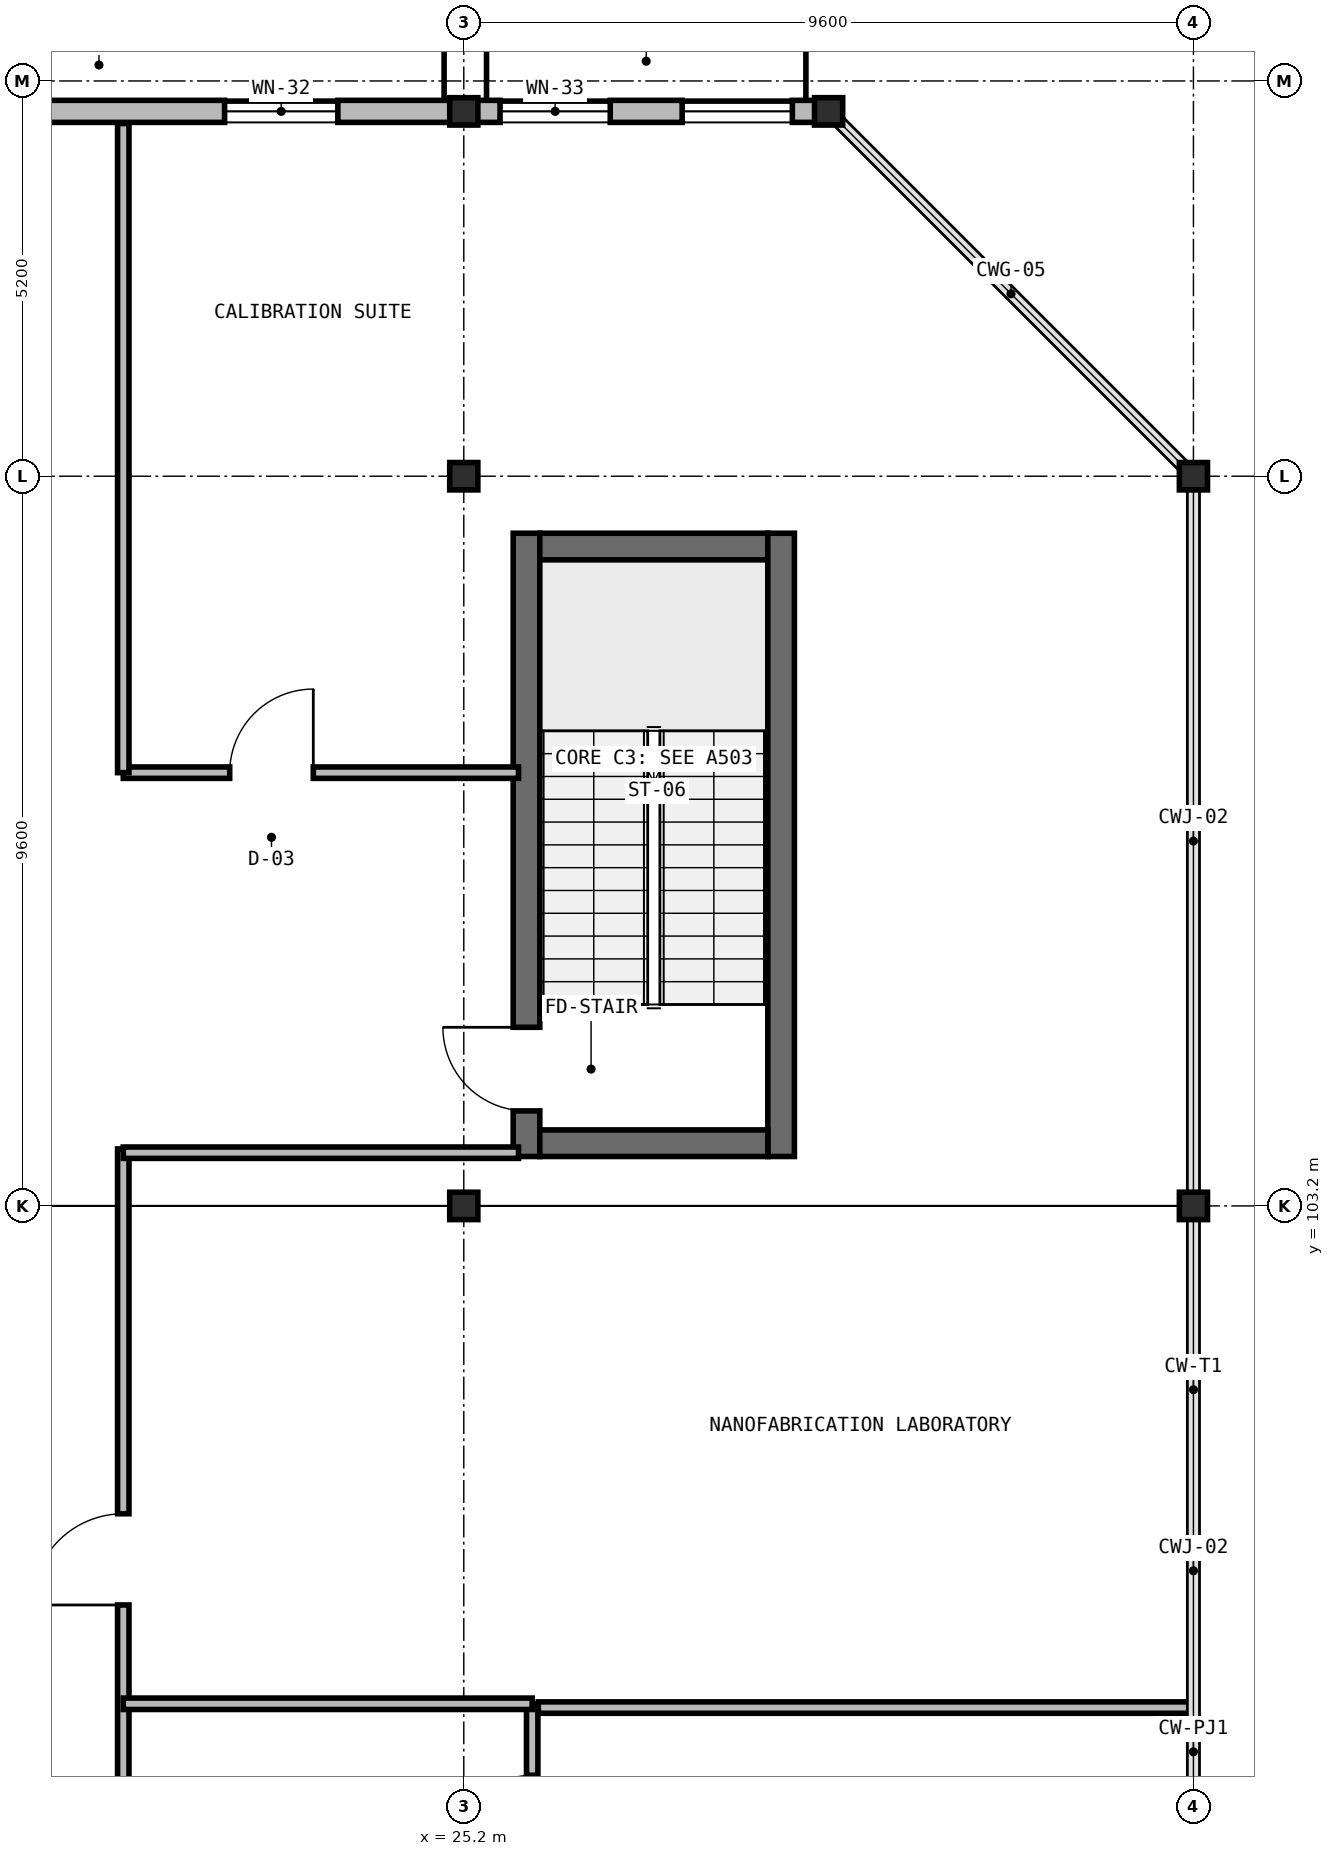
"""IFC4 building model, lengths in metres.
Left out: names, types, materials, properties, quantities, classifications, styles, units other than length and angle.
Written with IfcOpenShell. Run it as: python <this file> out.ifc"""

import sys

from ifc_helpers import new_model, si_unit, direction, frame, frame_2d, origin, origin_2d, place, context, subcontext, project, spatial, rectangle, i_section, extrude, element, fill, save


model = new_model("IFC4")
c1 = context("Model", 3, precision=1e-05, world=origin(), true_north=direction((0.0, 1.0)))
c2 = subcontext(c1, "Body", "Model", "MODEL_VIEW")
j1 = project(units=[si_unit("LENGTHUNIT", "METRE"), si_unit("PLANEANGLEUNIT", "RADIAN")], contexts=[c1])
p1 = place(None, origin())
s1 = spatial("IfcSite", under=j1, at=p1, CompositionType="ELEMENT")
p2 = place(p1, origin())
s2 = spatial("IfcBuilding", under=s1, at=p2, CompositionType="ELEMENT")
p3 = place(p2, frame((0.0, 0.0, 14.35)))
s3 = spatial("IfcBuildingStorey", under=s2, at=p3, CompositionType="ELEMENT", Elevation=14.35)
p4 = place(p3, frame((26.025, 103.85, 0.0), z_axis=(0.0, 0.0, 1.0), x_axis=(0.0, 1.0, 0.0)))
e1 = element("IfcWall", 1, at=p4, inside=s3, PredefinedType="SHEAR", context=c2, shape_type="SweptSolid", body=[
    extrude(rectangle(XDim=8.2, YDim=0.35, at=frame_2d((4.1, 0.0))), origin(), (0.0, 0.0, 1.0), 4.55),
])
p5 = place(p4, frame((0.6, 0.0, 0.0)))
e2 = element("IfcOpeningElement", 2, at=p5, cuts=e1, PredefinedType="OPENING", context=c2, shape_type="SweptSolid", body=[
    extrude(rectangle(XDim=1.1, YDim=2.15, at=frame_2d((0.55, 1.075))), frame((0.0, 0.185, 0.0), z_axis=(0.0, -1.0, 0.0), x_axis=(1.0, 0.0, 0.0)), (0.0, 0.0, 1.0), 0.37),
])
p6 = place(p3, frame((26.2, 111.875, 0.0), z_axis=(0.0, 0.0, 1.0), x_axis=(1.0, 0.0, 0.0)))
e3 = element("IfcWall", 3, at=p6, inside=s3, PredefinedType="SHEAR", context=c2, shape_type="SweptSolid", body=[
    extrude(rectangle(XDim=3.0, YDim=0.35, at=frame_2d((1.5, 0.0))), origin(), (0.0, 0.0, 1.0), 4.55),
])
p7 = place(p3, frame((29.375, 112.05, 0.0), z_axis=(0.0, 0.0, 1.0), x_axis=(0.0, -1.0, 0.0)))
e4 = element("IfcWall", 4, at=p7, inside=s3, PredefinedType="SHEAR", context=c2, shape_type="SweptSolid", body=[
    extrude(rectangle(XDim=8.2, YDim=0.35, at=frame_2d((4.1, 0.0))), origin(), (0.0, 0.0, 1.0), 4.55),
])
p8 = place(p3, frame((29.2, 104.025, 0.0), z_axis=(0.0, 0.0, 1.0), x_axis=(-1.0, 0.0, 0.0)))
e5 = element("IfcWall", 5, at=p8, inside=s3, PredefinedType="SHEAR", context=c2, shape_type="SweptSolid", body=[
    extrude(rectangle(XDim=3.0, YDim=0.35, at=frame_2d((1.5, 0.0))), origin(), (0.0, 0.0, 1.0), 4.55),
])
for number, where, z_axis, x_axis in (
    (6, (25.2, 103.2, 0.0), (0.0, 0.0, 1.0), (1.0, 0.0, 0.0)),
    (7, (25.2, 112.8, 0.0), (0.0, 0.0, 1.0), (1.0, 0.0, 0.0)),
    (8, (25.2, 117.6, 0.0), (0.0, 0.0, 1.0), (1.0, 0.0, 0.0)),
    (9, (34.8, 103.2, 0.0), (0.0, 0.0, 1.0), (1.0, 0.0, 0.0)),
    (10, (34.8, 112.8, 0.0), (0.0, 0.0, 1.0), (1.0, 0.0, 0.0)),
    (11, (30.0, 117.6, 0.0), (0.0, 0.0, 1.0), (1.0, 0.0, 0.0)),
):
    element("IfcColumn", number, at=place(p3, frame(where, z_axis=z_axis, x_axis=x_axis)), inside=s3, PredefinedType="COLUMN", context=c2, shape_type="SweptSolid", body=[
        extrude(i_section(OverallWidth=0.37, OverallDepth=0.36, WebThickness=0.014, FlangeThickness=0.022, at=origin_2d()), origin(), (0.0, 0.0, 1.0), 4.55),
    ])
p9 = place(p3, frame((15.604, 117.6, 0.0), z_axis=(0.0, 0.0, 1.0), x_axis=(1.0, 0.0, 0.0)))
e12 = element("IfcWall", 12, at=p9, inside=s3, PredefinedType="SOLIDWALL", context=c2, shape_type="SweptSolid", body=[
    extrude(rectangle(XDim=9.592, YDim=0.29, at=frame_2d((4.796, 0.0))), origin(), (0.0, 0.0, 1.0), 3.884),
])
p10 = place(p9, frame((6.449, 0.0, 0.95)))
e13 = element("IfcOpeningElement", 13, at=p10, cuts=e12, PredefinedType="OPENING", context=c2, shape_type="SweptSolid", body=[
    extrude(rectangle(XDim=1.49, YDim=1.43, at=frame_2d((0.745, 0.715))), frame((0.0, 0.155, 0.0), z_axis=(0.0, -1.0, 0.0), x_axis=(1.0, 0.0, 0.0)), (0.0, 0.0, 1.0), 0.31),
])
p11 = place(p3, frame((25.204, 117.6, 0.0), z_axis=(0.0, 0.0, 1.0), x_axis=(1.0, 0.0, 0.0)))
e14 = element("IfcWall", 14, at=p11, inside=s3, PredefinedType="SOLIDWALL", context=c2, shape_type="SweptSolid", body=[
    extrude(rectangle(XDim=4.792, YDim=0.29, at=frame_2d((2.396, 0.0))), origin(), (0.0, 0.0, 1.0), 4.37),
])
p12 = place(p11, frame((0.473, 0.0, 0.95)))
e15 = element("IfcOpeningElement", 15, at=p12, cuts=e14, PredefinedType="OPENING", context=c2, shape_type="SweptSolid", body=[
    extrude(rectangle(XDim=1.45, YDim=1.35, at=frame_2d((0.725, 0.675))), frame((0.0, 0.155, 0.0), z_axis=(0.0, -1.0, 0.0), x_axis=(1.0, 0.0, 0.0)), (0.0, 0.0, 1.0), 0.31),
])
p13 = place(p11, frame((2.869, 0.0, 0.95)))
e16 = element("IfcOpeningElement", 16, at=p13, cuts=e14, PredefinedType="OPENING", context=c2, shape_type="SweptSolid", body=[
    extrude(rectangle(XDim=1.45, YDim=1.35, at=frame_2d((0.725, 0.675))), frame((0.0, 0.155, 0.0), z_axis=(0.0, -1.0, 0.0), x_axis=(1.0, 0.0, 0.0)), (0.0, 0.0, 1.0), 0.31),
])
p14 = place(p3, frame((26.18, 96.6, 0.0), z_axis=(0.0, 0.0, 1.0), x_axis=(1.0, 0.0, 0.0)))
e17 = element("IfcWall", 17, at=p14, inside=s3, PredefinedType="PARTITIONING", context=c2, shape_type="SweptSolid", body=[
    extrude(rectangle(XDim=8.56, YDim=0.15, at=frame_2d((4.28, 0.0))), origin(), (0.0, 0.0, 1.0), 4.3),
])
p15 = place(p3, frame((26.1, 89.12, 0.0), z_axis=(0.0, 0.0, 1.0), x_axis=(0.0, 1.0, 0.0)))
e18 = element("IfcWall", 18, at=p15, inside=s3, PredefinedType="PARTITIONING", context=c2, shape_type="SweptSolid", body=[
    extrude(rectangle(XDim=7.53, YDim=0.15, at=frame_2d((3.765, 0.0))), origin(), (0.0, 0.0, 1.0), 4.3),
])
p16 = place(p15, frame((0.66, 0.0, 0.0)))
e19 = element("IfcOpeningElement", 19, at=p16, cuts=e18, PredefinedType="OPENING", context=c2, shape_type="SweptSolid", body=[
    extrude(rectangle(XDim=0.95, YDim=2.1, at=frame_2d((0.475, 1.05))), frame((0.0, 0.085, 0.0), z_axis=(0.0, -1.0, 0.0), x_axis=(1.0, 0.0, 0.0)), (0.0, 0.0, 1.0), 0.17),
])
p17 = place(p15, frame((2.44, 0.0, 0.0)))
e20 = element("IfcOpeningElement", 20, at=p17, cuts=e18, PredefinedType="OPENING", context=c2, shape_type="SweptSolid", body=[
    extrude(rectangle(XDim=0.95, YDim=2.1, at=frame_2d((0.475, 1.05))), frame((0.0, 0.085, 0.0), z_axis=(0.0, -1.0, 0.0), x_axis=(1.0, 0.0, 0.0)), (0.0, 0.0, 1.0), 0.17),
])
p18 = place(p15, frame((5.64, 0.0, 0.0)))
e21 = element("IfcOpeningElement", 21, at=p18, cuts=e18, PredefinedType="OPENING", context=c2, shape_type="SweptSolid", body=[
    extrude(rectangle(XDim=0.95, YDim=2.1, at=frame_2d((0.475, 1.05))), frame((0.0, 0.085, 0.0), z_axis=(0.0, -1.0, 0.0), x_axis=(1.0, 0.0, 0.0)), (0.0, 0.0, 1.0), 0.17),
])
p19 = place(p3, frame((20.72, 108.9, 0.0), z_axis=(0.0, 0.0, 1.0), x_axis=(1.0, 0.0, 0.0)))
e22 = element("IfcWall", 22, at=p19, inside=s3, PredefinedType="PARTITIONING", context=c2, shape_type="SweptSolid", body=[
    extrude(rectangle(XDim=5.2, YDim=0.15, at=frame_2d((2.6, 0.0))), origin(), (0.0, 0.0, 1.0), 4.3),
])
p20 = place(p19, frame((1.4, 0.0, 0.0)))
e23 = element("IfcOpeningElement", 23, at=p20, cuts=e22, PredefinedType="OPENING", context=c2, shape_type="SweptSolid", body=[
    extrude(rectangle(XDim=1.1, YDim=2.2, at=frame_2d((0.55, 1.1))), frame((0.0, 0.085, 0.0), z_axis=(0.0, -1.0, 0.0), x_axis=(1.0, 0.0, 0.0)), (0.0, 0.0, 1.0), 0.17),
])
p21 = place(p3, frame((20.72, 108.9, 0.0), z_axis=(0.0, 0.0, 1.0), x_axis=(0.0, 1.0, 0.0)))
e24 = element("IfcWall", 24, at=p21, inside=s3, PredefinedType="PARTITIONING", context=c2, shape_type="SweptSolid", body=[
    extrude(rectangle(XDim=8.54, YDim=0.15, at=frame_2d((4.27, 0.0))), origin(), (0.0, 0.0, 1.0), 4.3),
])
p22 = place(p3, frame((20.72, 91.15, 0.0), z_axis=(0.0, 0.0, 1.0), x_axis=(0.0, 1.0, 0.0)))
e25 = element("IfcWall", 25, at=p22, inside=s3, PredefinedType="PARTITIONING", context=c2, shape_type="SweptSolid", body=[
    extrude(rectangle(XDim=12.8, YDim=0.15, at=frame_2d((6.4, 0.0))), origin(), (0.0, 0.0, 1.0), 4.3),
])
p23 = place(p22, frame((1.8, 0.0, 0.0)))
e26 = element("IfcOpeningElement", 26, at=p23, cuts=e25, PredefinedType="OPENING", context=c2, shape_type="SweptSolid", body=[
    extrude(rectangle(XDim=1.1, YDim=2.2, at=frame_2d((0.55, 1.1))), frame((0.0, 0.085, 0.0), z_axis=(0.0, -1.0, 0.0), x_axis=(1.0, 0.0, 0.0)), (0.0, 0.0, 1.0), 0.17),
])
p24 = place(p22, frame((6.8, 0.0, 0.0)))
e27 = element("IfcOpeningElement", 27, at=p24, cuts=e25, PredefinedType="OPENING", context=c2, shape_type="SweptSolid", body=[
    extrude(rectangle(XDim=1.2, YDim=2.2, at=frame_2d((0.6, 1.1))), frame((0.0, 0.085, 0.0), z_axis=(0.0, -1.0, 0.0), x_axis=(1.0, 0.0, 0.0)), (0.0, 0.0, 1.0), 0.17),
])
p25 = place(p3, frame((20.72, 103.9, 0.0), z_axis=(0.0, 0.0, 1.0), x_axis=(1.0, 0.0, 0.0)))
e28 = element("IfcWall", 28, at=p25, inside=s3, PredefinedType="PARTITIONING", context=c2, shape_type="SweptSolid", body=[
    extrude(rectangle(XDim=5.2, YDim=0.15, at=frame_2d((2.6, 0.0))), origin(), (0.0, 0.0, 1.0), 4.3),
])
p26 = place(p3, frame((20.72, 96.65, 0.0), z_axis=(0.0, 0.0, 1.0), x_axis=(1.0, 0.0, 0.0)))
e29 = element("IfcWall", 29, at=p26, inside=s3, PredefinedType="PARTITIONING", context=c2, shape_type="SweptSolid", body=[
    extrude(rectangle(XDim=5.38, YDim=0.15, at=frame_2d((2.69, 0.0))), origin(), (0.0, 0.0, 1.0), 4.3),
])
p27 = place(p10, origin())
e30 = element("IfcWindow", 30, at=p27, inside=s3, PartitioningType="SINGLE_PANEL", PredefinedType="WINDOW", context=c2, shape_type="SweptSolid", body=[
    extrude(rectangle(XDim=1.49, YDim=1.43, at=frame_2d((0.745, 0.715))), frame((0.0, 0.03, 0.0), z_axis=(0.0, -1.0, 0.0), x_axis=(1.0, 0.0, 0.0)), (0.0, 0.0, 1.0), 0.06),
])
fill(e13, e30)
p28 = place(p12, origin())
e31 = element("IfcWindow", 31, at=p28, inside=s3, PartitioningType="SINGLE_PANEL", PredefinedType="WINDOW", context=c2, shape_type="SweptSolid", body=[
    extrude(rectangle(XDim=1.45, YDim=1.35, at=frame_2d((0.725, 0.675))), frame((0.0, 0.03, 0.0), z_axis=(0.0, -1.0, 0.0), x_axis=(1.0, 0.0, 0.0)), (0.0, 0.0, 1.0), 0.06),
])
fill(e15, e31)
p29 = place(p13, origin())
e32 = element("IfcWindow", 32, at=p29, inside=s3, PartitioningType="SINGLE_PANEL", PredefinedType="WINDOW", context=c2, shape_type="SweptSolid", body=[
    extrude(rectangle(XDim=1.45, YDim=1.35, at=frame_2d((0.725, 0.675))), frame((0.0, 0.03, 0.0), z_axis=(0.0, -1.0, 0.0), x_axis=(1.0, 0.0, 0.0)), (0.0, 0.0, 1.0), 0.06),
])
fill(e16, e32)
p30 = place(p5, origin())
e33 = element("IfcDoor", 33, at=p30, inside=s3, OperationType="SINGLE_SWING_RIGHT", PredefinedType="DOOR", context=c2, shape_type="SweptSolid", body=[
    extrude(rectangle(XDim=1.1, YDim=2.15, at=frame_2d((0.55, 1.075))), frame((0.0, 0.025, 0.0), z_axis=(0.0, -1.0, 0.0), x_axis=(1.0, 0.0, 0.0)), (0.0, 0.0, 1.0), 0.05),
])
fill(e2, e33)
p31 = place(p18, origin())
e34 = element("IfcDoor", 34, at=p31, inside=s3, OperationType="SINGLE_SWING_LEFT", PredefinedType="DOOR", context=c2, shape_type="SweptSolid", body=[
    extrude(rectangle(XDim=0.95, YDim=2.1, at=frame_2d((0.475, 1.05))), frame((0.0, 0.025, 0.0), z_axis=(0.0, -1.0, 0.0), x_axis=(1.0, 0.0, 0.0)), (0.0, 0.0, 1.0), 0.05),
])
fill(e21, e34)
p32 = place(p20, origin())
e35 = element("IfcDoor", 35, at=p32, inside=s3, OperationType="SINGLE_SWING_RIGHT", PredefinedType="DOOR", context=c2, shape_type="SweptSolid", body=[
    extrude(rectangle(XDim=1.1, YDim=2.2, at=frame_2d((0.55, 1.1))), frame((0.0, 0.025, 0.0), z_axis=(0.0, -1.0, 0.0), x_axis=(1.0, 0.0, 0.0)), (0.0, 0.0, 1.0), 0.05),
])
fill(e23, e35)
p33 = place(p24, origin())
e36 = element("IfcDoor", 36, at=p33, inside=s3, OperationType="SINGLE_SWING_LEFT", PredefinedType="DOOR", context=c2, shape_type="SweptSolid", body=[
    extrude(rectangle(XDim=1.2, YDim=2.2, at=frame_2d((0.6, 1.1))), frame((0.0, 0.025, 0.0), z_axis=(0.0, -1.0, 0.0), x_axis=(1.0, 0.0, 0.0)), (0.0, 0.0, 1.0), 0.05),
])
fill(e27, e36)
save(model, sys.argv[1])
